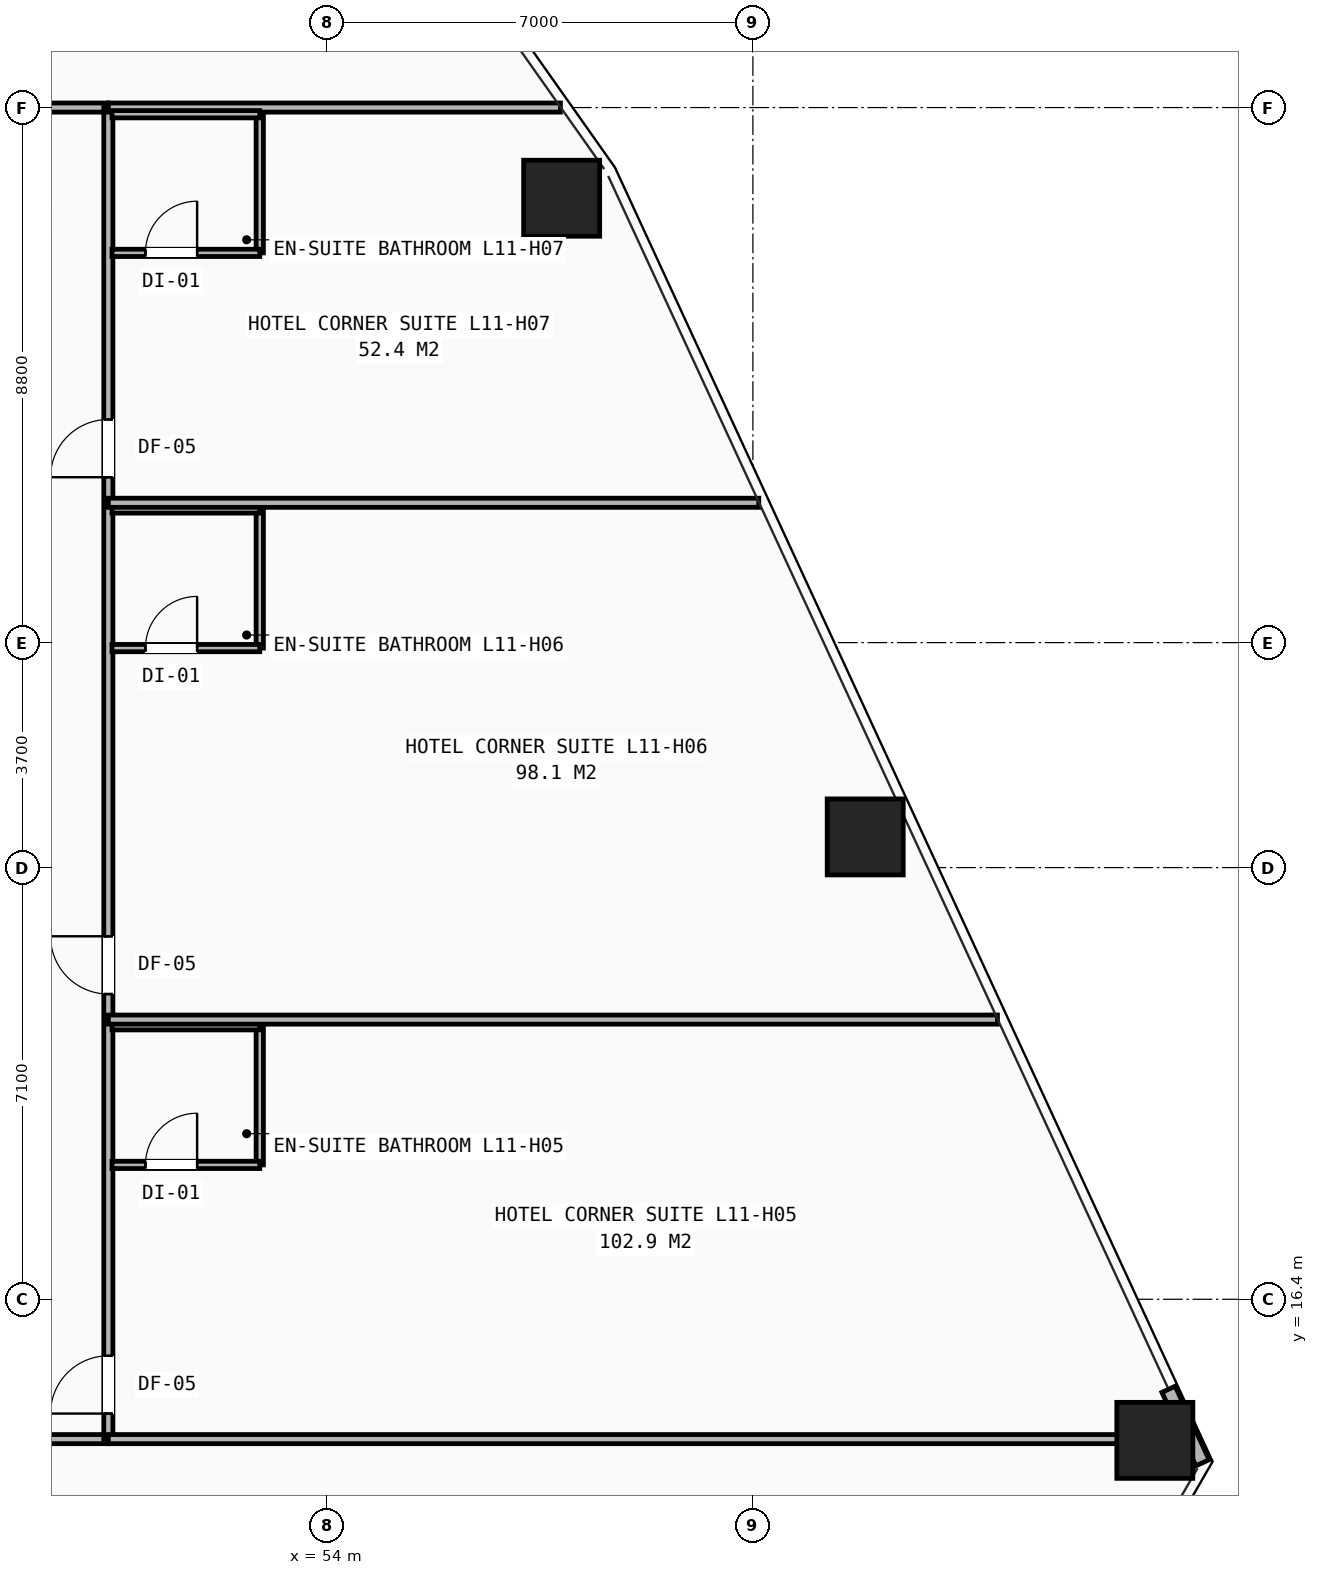
"""IFC4 building model, lengths in metres.
Left out: names, types, materials, properties, quantities, classifications, styles, units other than length and angle.
Written with IfcOpenShell. Run it as: python <this file> out.ifc"""

import sys

from ifc_helpers import new_model, si_unit, direction, frame, frame_2d, origin, origin_2d, place, context, subcontext, project, spatial, rectangle, hollow_rectangle, extrude, element, fill, save


model = new_model("IFC4")
c1 = context("Model", 3, precision=1e-05, world=origin(), true_north=direction((0.0, 1.0)))
c2 = subcontext(c1, "Body", "Model", "MODEL_VIEW")
j1 = project(units=[si_unit("LENGTHUNIT", "METRE"), si_unit("PLANEANGLEUNIT", "RADIAN")], contexts=[c1])
p1 = place(None, origin())
s1 = spatial("IfcSite", under=j1, at=p1, CompositionType="ELEMENT")
p2 = place(p1, origin())
s2 = spatial("IfcBuilding", under=s1, at=p2, CompositionType="ELEMENT")
p3 = place(p2, frame((0.0, 0.0, 43.2)))
s3 = spatial("IfcBuildingStorey", under=s2, at=p3, CompositionType="ELEMENT", Elevation=43.2)
for number, where, z_axis, x_axis in (
    (1, (67.611, 14.08, 0.0), (0.0, 0.0, 1.0), (1.0, 0.0, 0.0)),
    (2, (62.847, 24.004, 0.0), (0.0, 0.0, 1.0), (1.0, 0.0, 0.0)),
    (3, (57.855, 34.509, 0.0), (0.0, 0.0, 1.0), (1.0, 0.0, 0.0)),
):
    element("IfcColumn", number, at=place(p3, frame(where, z_axis=z_axis, x_axis=x_axis)), inside=s3, PredefinedType="COLUMN", context=c2, shape_type="SweptSolid", body=[
        extrude(hollow_rectangle(XDim=1.25, YDim=1.25, WallThickness=0.08, at=origin_2d()), origin(), (0.0, 0.0, 1.0), 3.2),
    ])
p4 = place(p3, frame((68.394, 13.711, 0.0), z_axis=(0.0, 0.0, 1.0), x_axis=(-0.419348851808, 0.907825170662, 0.0)))
e4 = element("IfcWall", 4, at=p4, inside=s3, PredefinedType="SHEAR", context=c2, shape_type="SweptSolid", body=[
    extrude(rectangle(XDim=1.332, YDim=0.24, at=frame_2d((0.666, 0.0))), origin(), (0.0, 0.0, 1.0), 2.263),
])
p5 = place(p3, frame((29.6, 14.1, 0.0), z_axis=(0.0, 0.0, 1.0), x_axis=(1.0, 0.0, 0.0)))
e5 = element("IfcWall", 5, at=p5, inside=s3, PredefinedType="PARTITIONING", context=c2, shape_type="SweptSolid", body=[
    extrude(rectangle(XDim=20.8, YDim=0.15, at=frame_2d((10.4, 0.0))), origin(), (0.0, 0.0, 1.0), 2.191),
])
p6 = place(p5, frame((0.57, 0.0, 0.0)))
e6 = element("IfcOpeningElement", 6, at=p6, cuts=e5, PredefinedType="OPENING", context=c2, shape_type="SweptSolid", body=[
    extrude(rectangle(XDim=0.95, YDim=2.1, at=frame_2d((0.475, 1.05))), frame((0.0, 0.085, 0.0), z_axis=(0.0, -1.0, 0.0), x_axis=(1.0, 0.0, 0.0)), (0.0, 0.0, 1.0), 0.17),
])
p7 = place(p5, frame((10.32, 0.0, 0.0)))
e7 = element("IfcOpeningElement", 7, at=p7, cuts=e5, PredefinedType="OPENING", context=c2, shape_type="SweptSolid", body=[
    extrude(rectangle(XDim=0.95, YDim=2.1, at=frame_2d((0.475, 1.05))), frame((0.0, 0.085, 0.0), z_axis=(0.0, -1.0, 0.0), x_axis=(1.0, 0.0, 0.0)), (0.0, 0.0, 1.0), 0.17),
])
p8 = place(p3, frame((40.75, 36.0, 0.0), z_axis=(0.0, 0.0, 1.0), x_axis=(1.0, 0.0, 0.0)))
e8 = element("IfcWall", 8, at=p8, inside=s3, PredefinedType="PARTITIONING", context=c2, shape_type="SweptSolid", body=[
    extrude(rectangle(XDim=9.65, YDim=0.15, at=frame_2d((4.825, 0.0))), origin(), (0.0, 0.0, 1.0), 2.513),
])
p9 = place(p8, frame((0.2, 0.0, 0.0)))
e9 = element("IfcOpeningElement", 9, at=p9, cuts=e8, PredefinedType="OPENING", context=c2, shape_type="SweptSolid", body=[
    extrude(rectangle(XDim=0.95, YDim=2.1, at=frame_2d((0.475, 1.05))), frame((0.0, 0.085, 0.0), z_axis=(0.0, -1.0, 0.0), x_axis=(1.0, 0.0, 0.0)), (0.0, 0.0, 1.0), 0.17),
])
p10 = place(p3, frame((50.4, 14.1, 0.0), z_axis=(0.0, 0.0, 1.0), x_axis=(0.0, 1.0, 0.0)))
e10 = element("IfcWall", 10, at=p10, inside=s3, PredefinedType="PARTITIONING", context=c2, shape_type="SweptSolid", body=[
    extrude(rectangle(XDim=21.9, YDim=0.15, at=frame_2d((10.95, 0.0))), origin(), (0.0, 0.0, 1.0), 2.191),
])
p11 = place(p10, frame((0.42, 0.0, 0.0)))
e11 = element("IfcOpeningElement", 11, at=p11, cuts=e10, PredefinedType="OPENING", context=c2, shape_type="SweptSolid", body=[
    extrude(rectangle(XDim=0.95, YDim=2.1, at=frame_2d((0.475, 1.05))), frame((0.0, 0.085, 0.0), z_axis=(0.0, -1.0, 0.0), x_axis=(1.0, 0.0, 0.0)), (0.0, 0.0, 1.0), 0.17),
])
p12 = place(p10, frame((7.32, 0.0, 0.0)))
e12 = element("IfcOpeningElement", 12, at=p12, cuts=e10, PredefinedType="OPENING", context=c2, shape_type="SweptSolid", body=[
    extrude(rectangle(XDim=0.95, YDim=2.1, at=frame_2d((0.475, 1.05))), frame((0.0, 0.085, 0.0), z_axis=(0.0, -1.0, 0.0), x_axis=(1.0, 0.0, 0.0)), (0.0, 0.0, 1.0), 0.17),
])
p13 = place(p10, frame((15.82, 0.0, 0.0)))
e13 = element("IfcOpeningElement", 13, at=p13, cuts=e10, PredefinedType="OPENING", context=c2, shape_type="SweptSolid", body=[
    extrude(rectangle(XDim=0.95, YDim=2.1, at=frame_2d((0.475, 1.05))), frame((0.0, 0.085, 0.0), z_axis=(0.0, -1.0, 0.0), x_axis=(1.0, 0.0, 0.0)), (0.0, 0.0, 1.0), 0.17),
])
p14 = place(p3, frame((50.4, 14.1, 0.0), z_axis=(0.0, 0.0, 1.0), x_axis=(1.0, 0.0, 0.0)))
e14 = element("IfcWall", 14, at=p14, inside=s3, PredefinedType="PARTITIONING", context=c2, shape_type="SweptSolid", body=[
    extrude(rectangle(XDim=17.809, YDim=0.15, at=frame_2d((8.904, 0.0))), origin(), (0.0, 0.0, 1.0), 2.191),
])
p15 = place(p3, frame((50.4, 36.0, 0.0), z_axis=(0.0, 0.0, 1.0), x_axis=(1.0, 0.0, 0.0)))
e15 = element("IfcWall", 15, at=p15, inside=s3, PredefinedType="PARTITIONING", context=c2, shape_type="SweptSolid", body=[
    extrude(rectangle(XDim=7.434, YDim=0.15, at=frame_2d((3.717, 0.0))), origin(), (0.0, 0.0, 1.0), 2.268),
])
p16 = place(p3, frame((52.89, 18.61, 0.0), z_axis=(0.0, 0.0, 1.0), x_axis=(0.0, 1.0, 0.0)))
e16 = element("IfcWall", 16, at=p16, inside=s3, PredefinedType="PARTITIONING", context=c2, shape_type="SweptSolid", body=[
    extrude(rectangle(XDim=2.28, YDim=0.12, at=frame_2d((1.14, 0.0))), origin(), (0.0, 0.0, 1.0), 2.98),
])
p17 = place(p3, frame((50.46, 18.61, 0.0), z_axis=(0.0, 0.0, 1.0), x_axis=(1.0, 0.0, 0.0)))
e17 = element("IfcWall", 17, at=p17, inside=s3, PredefinedType="PARTITIONING", context=c2, shape_type="SweptSolid", body=[
    extrude(rectangle(XDim=2.43, YDim=0.12, at=frame_2d((1.215, 0.0))), origin(), (0.0, 0.0, 1.0), 2.98),
])
p18 = place(p17, frame((0.55, 0.0, 0.0)))
e18 = element("IfcOpeningElement", 18, at=p18, cuts=e17, PredefinedType="OPENING", context=c2, shape_type="SweptSolid", body=[
    extrude(rectangle(XDim=0.85, YDim=2.05, at=frame_2d((0.425, 1.025))), frame((0.0, 0.07, 0.0), z_axis=(0.0, -1.0, 0.0), x_axis=(1.0, 0.0, 0.0)), (0.0, 0.0, 1.0), 0.14),
])
p19 = place(p3, frame((50.46, 20.89, 0.0), z_axis=(0.0, 0.0, 1.0), x_axis=(1.0, 0.0, 0.0)))
e19 = element("IfcWall", 19, at=p19, inside=s3, PredefinedType="PARTITIONING", context=c2, shape_type="SweptSolid", body=[
    extrude(rectangle(XDim=2.43, YDim=0.12, at=frame_2d((1.215, 0.0))), origin(), (0.0, 0.0, 1.0), 2.98),
])
p20 = place(p3, frame((50.4, 21.0, 0.0), z_axis=(0.0, 0.0, 1.0), x_axis=(1.0, 0.0, 0.0)))
e20 = element("IfcWall", 20, at=p20, inside=s3, PredefinedType="PARTITIONING", context=c2, shape_type="SweptSolid", body=[
    extrude(rectangle(XDim=14.622, YDim=0.15, at=frame_2d((7.311, 0.0))), origin(), (0.0, 0.0, 1.0), 2.268),
])
p21 = place(p3, frame((52.89, 27.11, 0.0), z_axis=(0.0, 0.0, 1.0), x_axis=(0.0, 1.0, 0.0)))
e21 = element("IfcWall", 21, at=p21, inside=s3, PredefinedType="PARTITIONING", context=c2, shape_type="SweptSolid", body=[
    extrude(rectangle(XDim=2.28, YDim=0.12, at=frame_2d((1.14, 0.0))), origin(), (0.0, 0.0, 1.0), 2.98),
])
p22 = place(p3, frame((50.46, 27.11, 0.0), z_axis=(0.0, 0.0, 1.0), x_axis=(1.0, 0.0, 0.0)))
e22 = element("IfcWall", 22, at=p22, inside=s3, PredefinedType="PARTITIONING", context=c2, shape_type="SweptSolid", body=[
    extrude(rectangle(XDim=2.43, YDim=0.12, at=frame_2d((1.215, 0.0))), origin(), (0.0, 0.0, 1.0), 2.98),
])
p23 = place(p22, frame((0.55, 0.0, 0.0)))
e23 = element("IfcOpeningElement", 23, at=p23, cuts=e22, PredefinedType="OPENING", context=c2, shape_type="SweptSolid", body=[
    extrude(rectangle(XDim=0.85, YDim=2.05, at=frame_2d((0.425, 1.025))), frame((0.0, 0.07, 0.0), z_axis=(0.0, -1.0, 0.0), x_axis=(1.0, 0.0, 0.0)), (0.0, 0.0, 1.0), 0.14),
])
p24 = place(p3, frame((50.46, 29.39, 0.0), z_axis=(0.0, 0.0, 1.0), x_axis=(1.0, 0.0, 0.0)))
e24 = element("IfcWall", 24, at=p24, inside=s3, PredefinedType="PARTITIONING", context=c2, shape_type="SweptSolid", body=[
    extrude(rectangle(XDim=2.43, YDim=0.12, at=frame_2d((1.215, 0.0))), origin(), (0.0, 0.0, 1.0), 2.98),
])
p25 = place(p3, frame((50.4, 29.5, 0.0), z_axis=(0.0, 0.0, 1.0), x_axis=(1.0, 0.0, 0.0)))
e25 = element("IfcWall", 25, at=p25, inside=s3, PredefinedType="PARTITIONING", context=c2, shape_type="SweptSolid", body=[
    extrude(rectangle(XDim=10.697, YDim=0.15, at=frame_2d((5.348, 0.0))), origin(), (0.0, 0.0, 1.0), 2.268),
])
p26 = place(p3, frame((52.89, 33.61, 0.0), z_axis=(0.0, 0.0, 1.0), x_axis=(0.0, 1.0, 0.0)))
e26 = element("IfcWall", 26, at=p26, inside=s3, PredefinedType="PARTITIONING", context=c2, shape_type="SweptSolid", body=[
    extrude(rectangle(XDim=2.28, YDim=0.12, at=frame_2d((1.14, 0.0))), origin(), (0.0, 0.0, 1.0), 2.98),
])
p27 = place(p3, frame((50.46, 33.61, 0.0), z_axis=(0.0, 0.0, 1.0), x_axis=(1.0, 0.0, 0.0)))
e27 = element("IfcWall", 27, at=p27, inside=s3, PredefinedType="PARTITIONING", context=c2, shape_type="SweptSolid", body=[
    extrude(rectangle(XDim=2.43, YDim=0.12, at=frame_2d((1.215, 0.0))), origin(), (0.0, 0.0, 1.0), 2.513),
])
p28 = place(p27, frame((0.55, 0.0, 0.0)))
e28 = element("IfcOpeningElement", 28, at=p28, cuts=e27, PredefinedType="OPENING", context=c2, shape_type="SweptSolid", body=[
    extrude(rectangle(XDim=0.85, YDim=2.05, at=frame_2d((0.425, 1.025))), frame((0.0, 0.07, 0.0), z_axis=(0.0, -1.0, 0.0), x_axis=(1.0, 0.0, 0.0)), (0.0, 0.0, 1.0), 0.14),
])
p29 = place(p3, frame((50.46, 35.89, 0.0), z_axis=(0.0, 0.0, 1.0), x_axis=(1.0, 0.0, 0.0)))
e29 = element("IfcWall", 29, at=p29, inside=s3, PredefinedType="PARTITIONING", context=c2, shape_type="SweptSolid", body=[
    extrude(rectangle(XDim=2.43, YDim=0.12, at=frame_2d((1.215, 0.0))), origin(), (0.0, 0.0, 1.0), 2.513),
])
p30 = place(p11, origin())
e30 = element("IfcDoor", 30, at=p30, inside=s3, OperationType="SINGLE_SWING_LEFT", PredefinedType="DOOR", context=c2, shape_type="SweptSolid", body=[
    extrude(rectangle(XDim=0.95, YDim=2.1, at=frame_2d((0.475, 1.05))), frame((0.0, 0.025, 0.0), z_axis=(0.0, -1.0, 0.0), x_axis=(1.0, 0.0, 0.0)), (0.0, 0.0, 1.0), 0.05),
])
fill(e11, e30)
p31 = place(p18, origin())
e31 = element("IfcDoor", 31, at=p31, inside=s3, OperationType="SINGLE_SWING_RIGHT", PredefinedType="DOOR", context=c2, shape_type="SweptSolid", body=[
    extrude(rectangle(XDim=0.85, YDim=2.05, at=frame_2d((0.425, 1.025))), frame((0.0, 0.025, 0.0), z_axis=(0.0, -1.0, 0.0), x_axis=(1.0, 0.0, 0.0)), (0.0, 0.0, 1.0), 0.05),
])
fill(e18, e31)
p32 = place(p12, origin())
e32 = element("IfcDoor", 32, at=p32, inside=s3, OperationType="SINGLE_SWING_RIGHT", PredefinedType="DOOR", context=c2, shape_type="SweptSolid", body=[
    extrude(rectangle(XDim=0.95, YDim=2.1, at=frame_2d((0.475, 1.05))), frame((0.0, 0.025, 0.0), z_axis=(0.0, -1.0, 0.0), x_axis=(1.0, 0.0, 0.0)), (0.0, 0.0, 1.0), 0.05),
])
fill(e12, e32)
p33 = place(p23, origin())
e33 = element("IfcDoor", 33, at=p33, inside=s3, OperationType="SINGLE_SWING_RIGHT", PredefinedType="DOOR", context=c2, shape_type="SweptSolid", body=[
    extrude(rectangle(XDim=0.85, YDim=2.05, at=frame_2d((0.425, 1.025))), frame((0.0, 0.025, 0.0), z_axis=(0.0, -1.0, 0.0), x_axis=(1.0, 0.0, 0.0)), (0.0, 0.0, 1.0), 0.05),
])
fill(e23, e33)
p34 = place(p13, origin())
e34 = element("IfcDoor", 34, at=p34, inside=s3, OperationType="SINGLE_SWING_LEFT", PredefinedType="DOOR", context=c2, shape_type="SweptSolid", body=[
    extrude(rectangle(XDim=0.95, YDim=2.1, at=frame_2d((0.475, 1.05))), frame((0.0, 0.025, 0.0), z_axis=(0.0, -1.0, 0.0), x_axis=(1.0, 0.0, 0.0)), (0.0, 0.0, 1.0), 0.05),
])
fill(e13, e34)
p35 = place(p28, origin())
e35 = element("IfcDoor", 35, at=p35, inside=s3, OperationType="SINGLE_SWING_RIGHT", PredefinedType="DOOR", context=c2, shape_type="SweptSolid", body=[
    extrude(rectangle(XDim=0.85, YDim=2.05, at=frame_2d((0.425, 1.025))), frame((0.0, 0.025, 0.0), z_axis=(0.0, -1.0, 0.0), x_axis=(1.0, 0.0, 0.0)), (0.0, 0.0, 1.0), 0.05),
])
fill(e28, e35)
save(model, sys.argv[1])
